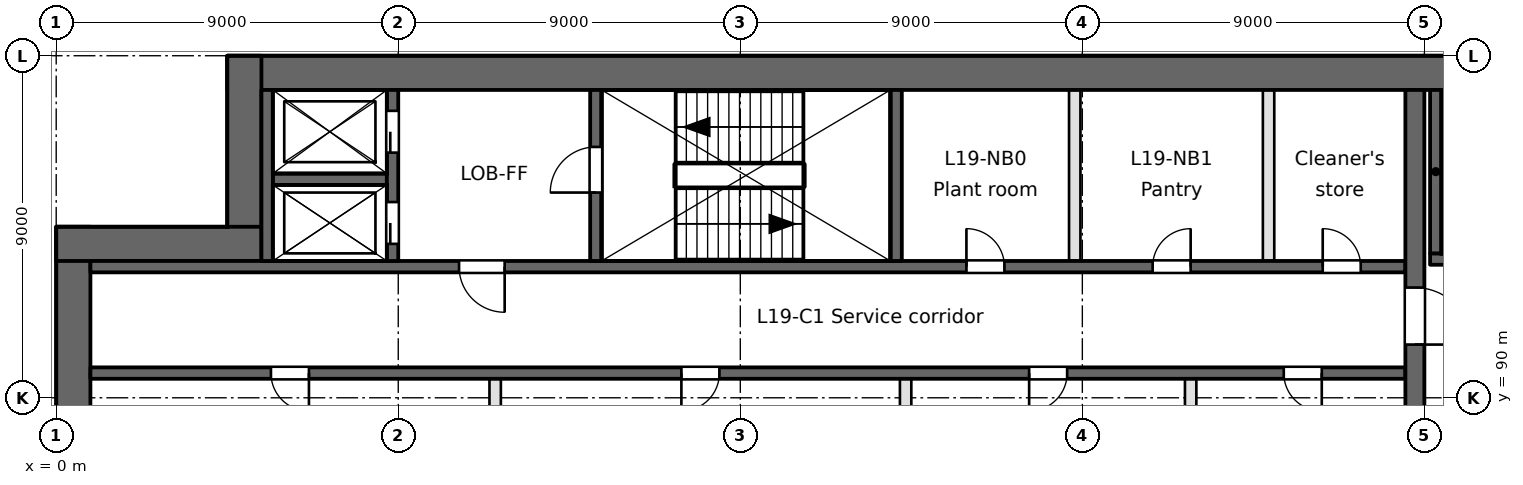
"""IFC4 building model, lengths in metres.
Left out: names, types, materials, properties, quantities, classifications, styles, units other than length and angle.
Written with IfcOpenShell. Run it as: python <this file> out.ifc"""

import sys

from ifc_helpers import new_model, si_unit, direction, frame, frame_2d, origin, place, context, subcontext, project, spatial, rectangle, extrude, element, fill, save


model = new_model("IFC4")
c1 = context("Model", 3, precision=1e-05, world=origin(), true_north=direction((0.0, 1.0)))
c2 = subcontext(c1, "Body", "Model", "MODEL_VIEW")
j1 = project(units=[si_unit("LENGTHUNIT", "METRE"), si_unit("PLANEANGLEUNIT", "RADIAN")], contexts=[c1])
p1 = place(None, origin())
s1 = spatial("IfcSite", under=j1, at=p1, CompositionType="ELEMENT")
p2 = place(p1, origin())
s2 = spatial("IfcBuilding", under=s1, at=p2, CompositionType="ELEMENT")
p3 = place(p2, frame((0.0, 0.0, 80.2)))
s3 = spatial("IfcBuildingStorey", under=s2, at=p3, CompositionType="ELEMENT", Elevation=80.2)
p4 = place(p3, frame((0.45, 94.5, 0.0), z_axis=(0.0, 0.0, 1.0), x_axis=(0.0, -1.0, 0.0)))
e1 = element("IfcWall", 1, at=p4, inside=s3, PredefinedType="SHEAR", context=c2, shape_type="SweptSolid", body=[
    extrude(rectangle(XDim=66.187, YDim=0.9, at=frame_2d((33.094, 0.0))), origin(), (0.0, 0.0, 1.0), 4.6),
])
p5 = place(p3, frame((76.5, 98.55, 0.0), z_axis=(0.0, 0.0, 1.0), x_axis=(-1.0, 0.0, 0.0)))
e2 = element("IfcWall", 2, at=p5, inside=s3, PredefinedType="SHEAR", context=c2, shape_type="SweptSolid", body=[
    extrude(rectangle(XDim=72.0, YDim=0.9, at=frame_2d((36.0, 0.0))), origin(), (0.0, 0.0, 1.0), 4.6),
])
for number, where, z_axis, x_axis in (
    (3, (4.95, 99.0, 0.0), (0.0, 0.0, 1.0), (0.0, -1.0, 0.0)),
    (4, (5.4, 94.05, 0.0), (0.0, 0.0, 1.0), (-1.0, 0.0, 0.0)),
):
    element("IfcWall", number, at=place(p3, frame(where, z_axis=z_axis, x_axis=x_axis)), inside=s3, PredefinedType="SHEAR", context=c2, shape_type="SweptSolid", body=[
        extrude(rectangle(XDim=5.4, YDim=0.9, at=frame_2d((2.7, 0.0))), origin(), (0.0, 0.0, 1.0), 4.6),
    ])
p6 = place(p3, frame((0.9, 90.65, -0.45), z_axis=(0.0, 0.0, 1.0), x_axis=(1.0, 0.0, 0.0)))
e5 = element("IfcWall", 5, at=p6, inside=s3, PredefinedType="SOLIDWALL", context=c2, shape_type="SweptSolid", body=[
    extrude(rectangle(XDim=34.6, YDim=0.3, at=frame_2d((17.3, 0.0))), origin(), (0.0, 0.0, 1.0), 4.65),
])
p7 = place(p6, frame((4.75, 0.0, 0.45)))
e6 = element("IfcOpeningElement", 6, at=p7, cuts=e5, PredefinedType="OPENING", context=c2, shape_type="SweptSolid", body=[
    extrude(rectangle(XDim=1.0, YDim=2.1, at=frame_2d((0.5, 1.05))), frame((0.0, 0.15, 0.0), z_axis=(0.0, -1.0, 0.0), x_axis=(1.0, 0.0, 0.0)), (0.0, 0.0, 1.0), 0.3),
])
p8 = place(p6, frame((24.7, 0.0, 0.45)))
e7 = element("IfcOpeningElement", 7, at=p8, cuts=e5, PredefinedType="OPENING", context=c2, shape_type="SweptSolid", body=[
    extrude(rectangle(XDim=1.0, YDim=2.1, at=frame_2d((0.5, 1.05))), frame((0.0, 0.15, 0.0), z_axis=(0.0, -1.0, 0.0), x_axis=(1.0, 0.0, 0.0)), (0.0, 0.0, 1.0), 0.3),
])
p9 = place(p6, frame((15.55, 0.0, 0.45)))
e8 = element("IfcOpeningElement", 8, at=p9, cuts=e5, PredefinedType="OPENING", context=c2, shape_type="SweptSolid", body=[
    extrude(rectangle(XDim=1.0, YDim=2.1, at=frame_2d((0.5, 1.05))), frame((0.0, 0.15, 0.0), z_axis=(0.0, -1.0, 0.0), x_axis=(1.0, 0.0, 0.0)), (0.0, 0.0, 1.0), 0.3),
])
p10 = place(p6, frame((31.4, 0.0, 0.45)))
e9 = element("IfcOpeningElement", 9, at=p10, cuts=e5, PredefinedType="OPENING", context=c2, shape_type="SweptSolid", body=[
    extrude(rectangle(XDim=1.0, YDim=2.1, at=frame_2d((0.5, 1.05))), frame((0.0, 0.15, 0.0), z_axis=(0.0, -1.0, 0.0), x_axis=(1.0, 0.0, 0.0)), (0.0, 0.0, 1.0), 0.3),
])
p11 = place(p3, frame((0.9, 93.45, -0.45), z_axis=(0.0, 0.0, 1.0), x_axis=(1.0, 0.0, 0.0)))
e10 = element("IfcWall", 10, at=p11, inside=s3, PredefinedType="SOLIDWALL", context=c2, shape_type="SweptSolid", body=[
    extrude(rectangle(XDim=34.6, YDim=0.3, at=frame_2d((17.3, 0.0))), origin(), (0.0, 0.0, 1.0), 4.65),
])
p12 = place(p11, frame((9.7, 0.0, 0.45)))
e11 = element("IfcOpeningElement", 11, at=p12, cuts=e10, PredefinedType="OPENING", context=c2, shape_type="SweptSolid", body=[
    extrude(rectangle(XDim=1.2, YDim=2.1, at=frame_2d((0.6, 1.05))), frame((0.0, 0.15, 0.0), z_axis=(0.0, -1.0, 0.0), x_axis=(1.0, 0.0, 0.0)), (0.0, 0.0, 1.0), 0.3),
])
p13 = place(p11, frame((23.05, 0.0, 0.45)))
e12 = element("IfcOpeningElement", 12, at=p13, cuts=e10, PredefinedType="OPENING", context=c2, shape_type="SweptSolid", body=[
    extrude(rectangle(XDim=1.0, YDim=2.1, at=frame_2d((0.5, 1.05))), frame((0.0, 0.15, 0.0), z_axis=(0.0, -1.0, 0.0), x_axis=(1.0, 0.0, 0.0)), (0.0, 0.0, 1.0), 0.3),
])
p14 = place(p11, frame((27.95, 0.0, 0.45)))
e13 = element("IfcOpeningElement", 13, at=p14, cuts=e10, PredefinedType="OPENING", context=c2, shape_type="SweptSolid", body=[
    extrude(rectangle(XDim=1.0, YDim=2.1, at=frame_2d((0.5, 1.05))), frame((0.0, 0.15, 0.0), z_axis=(0.0, -1.0, 0.0), x_axis=(1.0, 0.0, 0.0)), (0.0, 0.0, 1.0), 0.3),
])
p15 = place(p11, frame((32.425, 0.0, 0.45)))
e14 = element("IfcOpeningElement", 14, at=p15, cuts=e10, PredefinedType="OPENING", context=c2, shape_type="SweptSolid", body=[
    extrude(rectangle(XDim=1.0, YDim=2.1, at=frame_2d((0.5, 1.05))), frame((0.0, 0.15, 0.0), z_axis=(0.0, -1.0, 0.0), x_axis=(1.0, 0.0, 0.0)), (0.0, 0.0, 1.0), 0.3),
])
p16 = place(p3, frame((36.15, 93.65, -0.45), z_axis=(0.0, 0.0, 1.0), x_axis=(1.0, 0.0, 0.0)))
e15 = element("IfcWall", 15, at=p16, inside=s3, PredefinedType="SOLIDWALL", context=c2, shape_type="SweptSolid", body=[
    extrude(rectangle(XDim=8.2, YDim=0.3, at=frame_2d((4.1, 0.0))), origin(), (0.0, 0.0, 1.0), 4.65),
])
p17 = place(p16, frame((0.7, 0.0, 0.45)))
e16 = element("IfcOpeningElement", 16, at=p17, cuts=e15, PredefinedType="OPENING", context=c2, shape_type="SweptSolid", body=[
    extrude(rectangle(XDim=1.2, YDim=2.1, at=frame_2d((0.6, 1.05))), frame((0.0, 0.15, 0.0), z_axis=(0.0, -1.0, 0.0), x_axis=(1.0, 0.0, 0.0)), (0.0, 0.0, 1.0), 0.3),
])
p18 = place(p3, frame((5.7, 95.75, -0.45), z_axis=(0.0, 0.0, 1.0), x_axis=(1.0, 0.0, 0.0)))
e17 = element("IfcWall", 17, at=p18, inside=s3, PredefinedType="SOLIDWALL", context=c2, shape_type="SweptSolid", body=[
    extrude(rectangle(XDim=3.0, YDim=0.3, at=frame_2d((1.5, 0.0))), origin(), (0.0, 0.0, 1.0), 4.65),
])
p19 = place(p3, frame((5.55, 93.6, -0.45), z_axis=(0.0, 0.0, 1.0), x_axis=(0.0, 1.0, 0.0)))
e18 = element("IfcWall", 18, at=p19, inside=s3, PredefinedType="SOLIDWALL", context=c2, shape_type="SweptSolid", body=[
    extrude(rectangle(XDim=4.5, YDim=0.3, at=frame_2d((2.25, 0.0))), origin(), (0.0, 0.0, 1.0), 4.65),
])
p20 = place(p3, frame((8.85, 93.6, -0.45), z_axis=(0.0, 0.0, 1.0), x_axis=(0.0, 1.0, 0.0)))
e19 = element("IfcWall", 19, at=p20, inside=s3, PredefinedType="SOLIDWALL", context=c2, shape_type="SweptSolid", body=[
    extrude(rectangle(XDim=4.5, YDim=0.3, at=frame_2d((2.25, 0.0))), origin(), (0.0, 0.0, 1.0), 4.65),
])
p21 = place(p20, frame((0.45, 0.0, 0.45)))
e20 = element("IfcOpeningElement", 20, at=p21, cuts=e19, PredefinedType="OPENING", context=c2, shape_type="SweptSolid", body=[
    extrude(rectangle(XDim=1.1, YDim=2.1, at=frame_2d((0.55, 1.05))), frame((0.0, 0.15, 0.0), z_axis=(0.0, -1.0, 0.0), x_axis=(1.0, 0.0, 0.0)), (0.0, 0.0, 1.0), 0.3),
])
p22 = place(p20, frame((2.85, 0.0, 0.45)))
e21 = element("IfcOpeningElement", 21, at=p22, cuts=e19, PredefinedType="OPENING", context=c2, shape_type="SweptSolid", body=[
    extrude(rectangle(XDim=1.1, YDim=2.1, at=frame_2d((0.55, 1.05))), frame((0.0, 0.15, 0.0), z_axis=(0.0, -1.0, 0.0), x_axis=(1.0, 0.0, 0.0)), (0.0, 0.0, 1.0), 0.3),
])
p23 = place(p3, frame((11.55, 87.95, 0.0), z_axis=(0.0, 0.0, 1.0), x_axis=(0.0, 1.0, 0.0)))
e22 = element("IfcWall", 22, at=p23, inside=s3, PredefinedType="PARTITIONING", context=c2, shape_type="SweptSolid", body=[
    extrude(rectangle(XDim=2.55, YDim=0.3, at=frame_2d((1.275, 0.0))), origin(), (0.0, 0.0, 1.0), 4.2),
])
p24 = place(p3, frame((14.2, 93.6, -0.45), z_axis=(0.0, 0.0, 1.0), x_axis=(0.0, 1.0, 0.0)))
e23 = element("IfcWall", 23, at=p24, inside=s3, PredefinedType="SOLIDWALL", context=c2, shape_type="SweptSolid", body=[
    extrude(rectangle(XDim=4.5, YDim=0.3, at=frame_2d((2.25, 0.0))), origin(), (0.0, 0.0, 1.0), 4.65),
])
p25 = place(p24, frame((1.8, 0.0, 0.45)))
e24 = element("IfcOpeningElement", 24, at=p25, cuts=e23, PredefinedType="OPENING", context=c2, shape_type="SweptSolid", body=[
    extrude(rectangle(XDim=1.2, YDim=2.1, at=frame_2d((0.6, 1.05))), frame((0.0, 0.15, 0.0), z_axis=(0.0, -1.0, 0.0), x_axis=(1.0, 0.0, 0.0)), (0.0, 0.0, 1.0), 0.3),
])
p26 = place(p3, frame((22.1, 93.6, -0.45), z_axis=(0.0, 0.0, 1.0), x_axis=(0.0, 1.0, 0.0)))
e25 = element("IfcWall", 25, at=p26, inside=s3, PredefinedType="SOLIDWALL", context=c2, shape_type="SweptSolid", body=[
    extrude(rectangle(XDim=4.5, YDim=0.3, at=frame_2d((2.25, 0.0))), origin(), (0.0, 0.0, 1.0), 4.65),
])
p27 = place(p3, frame((22.35, 87.95, 0.0), z_axis=(0.0, 0.0, 1.0), x_axis=(0.0, 1.0, 0.0)))
e26 = element("IfcWall", 26, at=p27, inside=s3, PredefinedType="PARTITIONING", context=c2, shape_type="SweptSolid", body=[
    extrude(rectangle(XDim=2.55, YDim=0.3, at=frame_2d((1.275, 0.0))), origin(), (0.0, 0.0, 1.0), 4.2),
])
p28 = place(p3, frame((26.8, 93.6, 0.0), z_axis=(0.0, 0.0, 1.0), x_axis=(0.0, 1.0, 0.0)))
e27 = element("IfcWall", 27, at=p28, inside=s3, PredefinedType="PARTITIONING", context=c2, shape_type="SweptSolid", body=[
    extrude(rectangle(XDim=4.5, YDim=0.3, at=frame_2d((2.25, 0.0))), origin(), (0.0, 0.0, 1.0), 4.2),
])
p29 = place(p3, frame((29.85, 87.95, 0.0), z_axis=(0.0, 0.0, 1.0), x_axis=(0.0, 1.0, 0.0)))
e28 = element("IfcWall", 28, at=p29, inside=s3, PredefinedType="PARTITIONING", context=c2, shape_type="SweptSolid", body=[
    extrude(rectangle(XDim=2.55, YDim=0.3, at=frame_2d((1.275, 0.0))), origin(), (0.0, 0.0, 1.0), 4.2),
])
p30 = place(p3, frame((31.9, 93.6, 0.0), z_axis=(0.0, 0.0, 1.0), x_axis=(0.0, 1.0, 0.0)))
e29 = element("IfcWall", 29, at=p30, inside=s3, PredefinedType="PARTITIONING", context=c2, shape_type="SweptSolid", body=[
    extrude(rectangle(XDim=4.5, YDim=0.3, at=frame_2d((2.25, 0.0))), origin(), (0.0, 0.0, 1.0), 4.2),
])
p31 = place(p3, frame((35.75, 63.5, -0.45), z_axis=(0.0, 0.0, 1.0), x_axis=(0.0, 1.0, 0.0)))
e30 = element("IfcWall", 30, at=p31, inside=s3, PredefinedType="SOLIDWALL", context=c2, shape_type="SweptSolid", body=[
    extrude(rectangle(XDim=34.6, YDim=0.5, at=frame_2d((17.3, 0.0))), origin(), (0.0, 0.0, 1.0), 4.65),
])
p32 = place(p31, frame((9.7, 0.0, 0.45)))
e31 = element("IfcOpeningElement", 31, at=p32, cuts=e30, PredefinedType="OPENING", context=c2, shape_type="SweptSolid", body=[
    extrude(rectangle(XDim=2.4, YDim=2.1, at=frame_2d((1.2, 1.05))), frame((0.0, 0.25, 0.0), z_axis=(0.0, -1.0, 0.0), x_axis=(1.0, 0.0, 0.0)), (0.0, 0.0, 1.0), 0.5),
])
p33 = place(p31, frame((27.9, 0.0, 0.45)))
e32 = element("IfcOpeningElement", 32, at=p33, cuts=e30, PredefinedType="OPENING", context=c2, shape_type="SweptSolid", body=[
    extrude(rectangle(XDim=1.5, YDim=2.1, at=frame_2d((0.75, 1.05))), frame((0.0, 0.25, 0.0), z_axis=(0.0, -1.0, 0.0), x_axis=(1.0, 0.0, 0.0)), (0.0, 0.0, 1.0), 0.5),
])
p34 = place(p31, frame((1.5, 0.0, 0.45)))
e33 = element("IfcOpeningElement", 33, at=p34, cuts=e30, PredefinedType="OPENING", context=c2, shape_type="SweptSolid", body=[
    extrude(rectangle(XDim=1.2, YDim=2.1, at=frame_2d((0.6, 1.05))), frame((0.0, 0.25, 0.0), z_axis=(0.0, -1.0, 0.0), x_axis=(1.0, 0.0, 0.0)), (0.0, 0.0, 1.0), 0.5),
])
p35 = place(p3, frame((36.3, 93.8, -0.45), z_axis=(0.0, 0.0, 1.0), x_axis=(0.0, 1.0, 0.0)))
e34 = element("IfcWall", 34, at=p35, inside=s3, PredefinedType="SOLIDWALL", context=c2, shape_type="SweptSolid", body=[
    extrude(rectangle(XDim=4.3, YDim=0.3, at=frame_2d((2.15, 0.0))), origin(), (0.0, 0.0, 1.0), 4.65),
])
p36 = place(p21, origin())
e35 = element("IfcDoor", 35, at=p36, inside=s3, OperationType="SLIDING_TO_RIGHT", PredefinedType="DOOR", context=c2, shape_type="SweptSolid", body=[
    extrude(rectangle(XDim=1.1, YDim=2.1, at=frame_2d((0.55, 1.05))), frame((0.0, 0.025, 0.0), z_axis=(0.0, -1.0, 0.0), x_axis=(1.0, 0.0, 0.0)), (0.0, 0.0, 1.0), 0.05),
])
fill(e20, e35)
p37 = place(p22, origin())
e36 = element("IfcDoor", 36, at=p37, inside=s3, OperationType="SLIDING_TO_LEFT", PredefinedType="DOOR", context=c2, shape_type="SweptSolid", body=[
    extrude(rectangle(XDim=1.1, YDim=2.1, at=frame_2d((0.55, 1.05))), frame((0.0, 0.025, 0.0), z_axis=(0.0, -1.0, 0.0), x_axis=(1.0, 0.0, 0.0)), (0.0, 0.0, 1.0), 0.05),
])
fill(e21, e36)
p38 = place(p12, frame((1.2, 0.0, 0.0), z_axis=(0.0, 0.0, 1.0), x_axis=(-1.0, 0.0, 0.0)))
e37 = element("IfcDoor", 37, at=p38, inside=s3, OperationType="SINGLE_SWING_LEFT", PredefinedType="DOOR", context=c2, shape_type="SweptSolid", body=[
    extrude(rectangle(XDim=1.2, YDim=2.1, at=frame_2d((0.6, 1.05))), frame((0.0, 0.025, 0.0), z_axis=(0.0, -1.0, 0.0), x_axis=(1.0, 0.0, 0.0)), (0.0, 0.0, 1.0), 0.05),
])
fill(e11, e37)
p39 = place(p33, frame((1.5, 0.0, 0.0), z_axis=(0.0, 0.0, 1.0), x_axis=(-1.0, 0.0, 0.0)))
e38 = element("IfcDoor", 38, at=p39, inside=s3, OperationType="SINGLE_SWING_RIGHT", PredefinedType="DOOR", context=c2, shape_type="SweptSolid", body=[
    extrude(rectangle(XDim=1.5, YDim=2.1, at=frame_2d((0.75, 1.05))), frame((0.0, 0.025, 0.0), z_axis=(0.0, -1.0, 0.0), x_axis=(1.0, 0.0, 0.0)), (0.0, 0.0, 1.0), 0.05),
])
fill(e32, e38)
p40 = place(p25, origin())
e39 = element("IfcDoor", 39, at=p40, inside=s3, OperationType="SINGLE_SWING_LEFT", PredefinedType="DOOR", context=c2, shape_type="SweptSolid", body=[
    extrude(rectangle(XDim=1.2, YDim=2.1, at=frame_2d((0.6, 1.05))), frame((0.0, 0.025, 0.0), z_axis=(0.0, -1.0, 0.0), x_axis=(1.0, 0.0, 0.0)), (0.0, 0.0, 1.0), 0.05),
])
fill(e24, e39)
p41 = place(p7, frame((1.0, 0.0, 0.0), z_axis=(0.0, 0.0, 1.0), x_axis=(-1.0, 0.0, 0.0)))
e40 = element("IfcDoor", 40, at=p41, inside=s3, OperationType="SINGLE_SWING_LEFT", PredefinedType="DOOR", context=c2, shape_type="SweptSolid", body=[
    extrude(rectangle(XDim=1.0, YDim=2.1, at=frame_2d((0.5, 1.05))), frame((0.0, 0.025, 0.0), z_axis=(0.0, -1.0, 0.0), x_axis=(1.0, 0.0, 0.0)), (0.0, 0.0, 1.0), 0.05),
])
fill(e6, e40)
p42 = place(p8, frame((1.0, 0.0, 0.0), z_axis=(0.0, 0.0, 1.0), x_axis=(-1.0, 0.0, 0.0)))
e41 = element("IfcDoor", 41, at=p42, inside=s3, OperationType="SINGLE_SWING_RIGHT", PredefinedType="DOOR", context=c2, shape_type="SweptSolid", body=[
    extrude(rectangle(XDim=1.0, YDim=2.1, at=frame_2d((0.5, 1.05))), frame((0.0, 0.025, 0.0), z_axis=(0.0, -1.0, 0.0), x_axis=(1.0, 0.0, 0.0)), (0.0, 0.0, 1.0), 0.05),
])
fill(e7, e41)
p43 = place(p9, frame((1.0, 0.0, 0.0), z_axis=(0.0, 0.0, 1.0), x_axis=(-1.0, 0.0, 0.0)))
e42 = element("IfcDoor", 42, at=p43, inside=s3, OperationType="SINGLE_SWING_RIGHT", PredefinedType="DOOR", context=c2, shape_type="SweptSolid", body=[
    extrude(rectangle(XDim=1.0, YDim=2.1, at=frame_2d((0.5, 1.05))), frame((0.0, 0.025, 0.0), z_axis=(0.0, -1.0, 0.0), x_axis=(1.0, 0.0, 0.0)), (0.0, 0.0, 1.0), 0.05),
])
fill(e8, e42)
p44 = place(p10, frame((1.0, 0.0, 0.0), z_axis=(0.0, 0.0, 1.0), x_axis=(-1.0, 0.0, 0.0)))
e43 = element("IfcDoor", 43, at=p44, inside=s3, OperationType="SINGLE_SWING_LEFT", PredefinedType="DOOR", context=c2, shape_type="SweptSolid", body=[
    extrude(rectangle(XDim=1.0, YDim=2.1, at=frame_2d((0.5, 1.05))), frame((0.0, 0.025, 0.0), z_axis=(0.0, -1.0, 0.0), x_axis=(1.0, 0.0, 0.0)), (0.0, 0.0, 1.0), 0.05),
])
fill(e9, e43)
p45 = place(p13, origin())
e44 = element("IfcDoor", 44, at=p45, inside=s3, OperationType="SINGLE_SWING_LEFT", PredefinedType="DOOR", context=c2, shape_type="SweptSolid", body=[
    extrude(rectangle(XDim=1.0, YDim=2.1, at=frame_2d((0.5, 1.05))), frame((0.0, 0.025, 0.0), z_axis=(0.0, -1.0, 0.0), x_axis=(1.0, 0.0, 0.0)), (0.0, 0.0, 1.0), 0.05),
])
fill(e12, e44)
p46 = place(p14, origin())
e45 = element("IfcDoor", 45, at=p46, inside=s3, OperationType="SINGLE_SWING_RIGHT", PredefinedType="DOOR", context=c2, shape_type="SweptSolid", body=[
    extrude(rectangle(XDim=1.0, YDim=2.1, at=frame_2d((0.5, 1.05))), frame((0.0, 0.025, 0.0), z_axis=(0.0, -1.0, 0.0), x_axis=(1.0, 0.0, 0.0)), (0.0, 0.0, 1.0), 0.05),
])
fill(e13, e45)
p47 = place(p15, origin())
e46 = element("IfcDoor", 46, at=p47, inside=s3, OperationType="SINGLE_SWING_LEFT", PredefinedType="DOOR", context=c2, shape_type="SweptSolid", body=[
    extrude(rectangle(XDim=1.0, YDim=2.1, at=frame_2d((0.5, 1.05))), frame((0.0, 0.025, 0.0), z_axis=(0.0, -1.0, 0.0), x_axis=(1.0, 0.0, 0.0)), (0.0, 0.0, 1.0), 0.05),
])
fill(e14, e46)
save(model, sys.argv[1])
